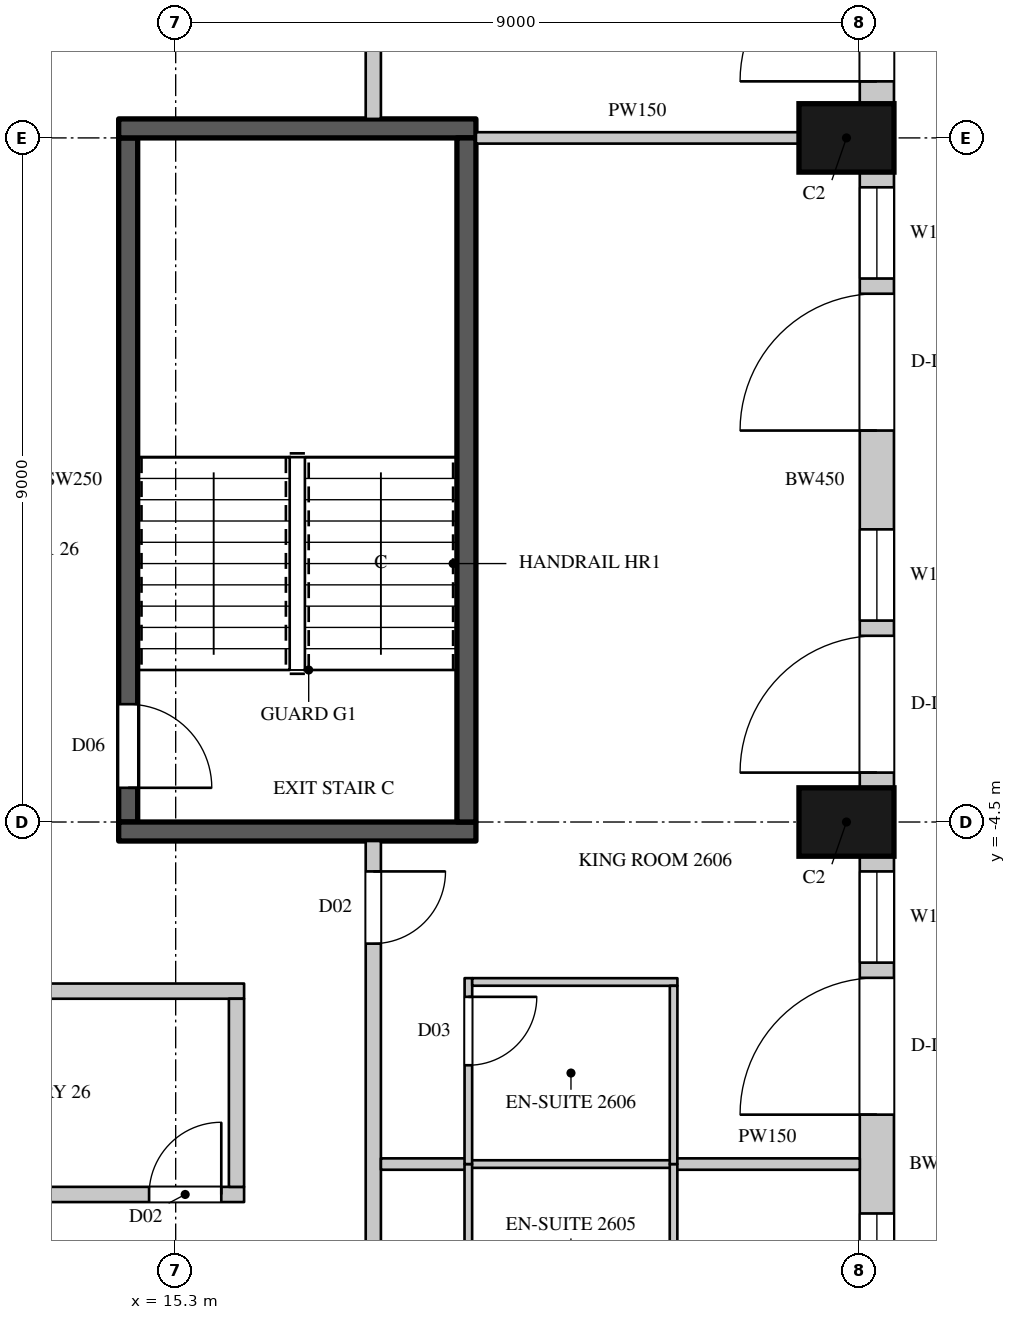
"""IFC4 building model, lengths in metres.
Left out: names, types, materials, properties, quantities, classifications, styles, units other than length and angle.
Written with IfcOpenShell. Run it as: python <this file> out.ifc"""

import sys

from ifc_helpers import new_model, si_unit, direction, frame, frame_2d, origin, origin_2d, place, context, subcontext, project, spatial, rectangle, extrude, element, fill, save


model = new_model("IFC4")
c1 = context("Model", 3, precision=1e-05, world=origin(), true_north=direction((0.0, 1.0)))
c2 = subcontext(c1, "Body", "Model", "MODEL_VIEW")
j1 = project(units=[si_unit("LENGTHUNIT", "METRE"), si_unit("PLANEANGLEUNIT", "RADIAN")], contexts=[c1])
p1 = place(None, origin())
s1 = spatial("IfcSite", under=j1, at=p1, CompositionType="ELEMENT")
p2 = place(p1, origin())
s2 = spatial("IfcBuilding", under=s1, at=p2, CompositionType="ELEMENT")
p3 = place(p2, frame((0.0, 0.0, 123.9)))
s3 = spatial("IfcBuildingStorey", under=s2, at=p3, CompositionType="ELEMENT", Elevation=123.9)
for number, where, z_axis, x_axis in (
    (1, (24.125, -4.5, 0.0), (0.0, 0.0, 1.0), (0.0, 1.0, 0.0)),
    (2, (24.125, 4.5, 0.0), (0.0, 0.0, 1.0), (0.0, 1.0, 0.0)),
):
    element("IfcColumn", number, at=place(p3, frame(where, z_axis=z_axis, x_axis=x_axis)), inside=s3, PredefinedType="COLUMN", context=c2, shape_type="SweptSolid", body=[
        extrude(rectangle(XDim=0.9, YDim=1.25, at=origin_2d()), origin(), (0.0, 0.0, 1.0), 3.6),
    ])
p4 = place(p3, frame((24.525, -13.05, 0.0), z_axis=(0.0, 0.0, 1.0), x_axis=(0.0, 1.0, 0.0)))
e3 = element("IfcWall", 3, at=p4, inside=s3, PredefinedType="SOLIDWALL", context=c2, shape_type="SweptSolid", body=[
    extrude(rectangle(XDim=8.1, YDim=0.45, at=frame_2d((4.05, 0.0))), origin(), (0.0, 0.0, 1.0), 3.3),
])
p5 = place(p4, frame((0.2, 0.0, 0.0)))
e4 = element("IfcOpeningElement", 4, at=p5, cuts=e3, PredefinedType="OPENING", context=c2, shape_type="SweptSolid", body=[
    extrude(rectangle(XDim=1.8, YDim=2.4, at=frame_2d((0.9, 1.2))), frame((0.0, 0.235, 0.0), z_axis=(0.0, -1.0, 0.0), x_axis=(1.0, 0.0, 0.0)), (0.0, 0.0, 1.0), 0.47),
])
p6 = place(p4, frame((2.2, 0.0, 1.05)))
e5 = element("IfcOpeningElement", 5, at=p6, cuts=e3, PredefinedType="OPENING", context=c2, shape_type="SweptSolid", body=[
    extrude(rectangle(XDim=1.2, YDim=2.0, at=frame_2d((0.6, 1.0))), frame((0.0, 0.235, 0.0), z_axis=(0.0, -1.0, 0.0), x_axis=(1.0, 0.0, 0.0)), (0.0, 0.0, 1.0), 0.47),
])
p7 = place(p4, frame((4.7, 0.0, 0.0)))
e6 = element("IfcOpeningElement", 6, at=p7, cuts=e3, PredefinedType="OPENING", context=c2, shape_type="SweptSolid", body=[
    extrude(rectangle(XDim=1.8, YDim=2.4, at=frame_2d((0.9, 1.2))), frame((0.0, 0.235, 0.0), z_axis=(0.0, -1.0, 0.0), x_axis=(1.0, 0.0, 0.0)), (0.0, 0.0, 1.0), 0.47),
])
p8 = place(p4, frame((6.7, 0.0, 1.05)))
e7 = element("IfcOpeningElement", 7, at=p8, cuts=e3, PredefinedType="OPENING", context=c2, shape_type="SweptSolid", body=[
    extrude(rectangle(XDim=1.2, YDim=2.0, at=frame_2d((0.6, 1.0))), frame((0.0, 0.235, 0.0), z_axis=(0.0, -1.0, 0.0), x_axis=(1.0, 0.0, 0.0)), (0.0, 0.0, 1.0), 0.47),
])
p9 = place(p3, frame((24.525, -4.05, 0.0), z_axis=(0.0, 0.0, 1.0), x_axis=(0.0, 1.0, 0.0)))
e8 = element("IfcWall", 8, at=p9, inside=s3, PredefinedType="SOLIDWALL", context=c2, shape_type="SweptSolid", body=[
    extrude(rectangle(XDim=8.1, YDim=0.45, at=frame_2d((4.05, 0.0))), origin(), (0.0, 0.0, 1.0), 3.3),
])
p10 = place(p9, frame((0.2, 0.0, 0.0)))
e9 = element("IfcOpeningElement", 9, at=p10, cuts=e8, PredefinedType="OPENING", context=c2, shape_type="SweptSolid", body=[
    extrude(rectangle(XDim=1.8, YDim=2.4, at=frame_2d((0.9, 1.2))), frame((0.0, 0.235, 0.0), z_axis=(0.0, -1.0, 0.0), x_axis=(1.0, 0.0, 0.0)), (0.0, 0.0, 1.0), 0.47),
])
p11 = place(p9, frame((2.2, 0.0, 1.05)))
e10 = element("IfcOpeningElement", 10, at=p11, cuts=e8, PredefinedType="OPENING", context=c2, shape_type="SweptSolid", body=[
    extrude(rectangle(XDim=1.2, YDim=2.0, at=frame_2d((0.6, 1.0))), frame((0.0, 0.235, 0.0), z_axis=(0.0, -1.0, 0.0), x_axis=(1.0, 0.0, 0.0)), (0.0, 0.0, 1.0), 0.47),
])
p12 = place(p9, frame((4.7, 0.0, 0.0)))
e11 = element("IfcOpeningElement", 11, at=p12, cuts=e8, PredefinedType="OPENING", context=c2, shape_type="SweptSolid", body=[
    extrude(rectangle(XDim=1.8, YDim=2.4, at=frame_2d((0.9, 1.2))), frame((0.0, 0.235, 0.0), z_axis=(0.0, -1.0, 0.0), x_axis=(1.0, 0.0, 0.0)), (0.0, 0.0, 1.0), 0.47),
])
p13 = place(p9, frame((6.7, 0.0, 1.05)))
e12 = element("IfcOpeningElement", 12, at=p13, cuts=e8, PredefinedType="OPENING", context=c2, shape_type="SweptSolid", body=[
    extrude(rectangle(XDim=1.2, YDim=2.0, at=frame_2d((0.6, 1.0))), frame((0.0, 0.235, 0.0), z_axis=(0.0, -1.0, 0.0), x_axis=(1.0, 0.0, 0.0)), (0.0, 0.0, 1.0), 0.47),
])
p14 = place(p3, frame((24.525, 4.95, 0.0), z_axis=(0.0, 0.0, 1.0), x_axis=(0.0, 1.0, 0.0)))
e13 = element("IfcWall", 13, at=p14, inside=s3, PredefinedType="SOLIDWALL", context=c2, shape_type="SweptSolid", body=[
    extrude(rectangle(XDim=8.439, YDim=0.45, at=frame_2d((4.219, 0.0))), origin(), (0.0, 0.0, 1.0), 3.3),
])
p15 = place(p14, frame((0.294, 0.0, 0.0)))
e14 = element("IfcOpeningElement", 14, at=p15, cuts=e13, PredefinedType="OPENING", context=c2, shape_type="SweptSolid", body=[
    extrude(rectangle(XDim=1.8, YDim=2.4, at=frame_2d((0.9, 1.2))), frame((0.0, 0.235, 0.0), z_axis=(0.0, -1.0, 0.0), x_axis=(1.0, 0.0, 0.0)), (0.0, 0.0, 1.0), 0.47),
])
p16 = place(p14, frame((2.294, 0.0, 1.05)))
e15 = element("IfcOpeningElement", 15, at=p16, cuts=e13, PredefinedType="OPENING", context=c2, shape_type="SweptSolid", body=[
    extrude(rectangle(XDim=1.2, YDim=2.0, at=frame_2d((0.6, 1.0))), frame((0.0, 0.235, 0.0), z_axis=(0.0, -1.0, 0.0), x_axis=(1.0, 0.0, 0.0)), (0.0, 0.0, 1.0), 0.47),
])
p17 = place(p14, frame((5.232, 0.0, 1.05)))
e16 = element("IfcOpeningElement", 16, at=p17, cuts=e13, PredefinedType="OPENING", context=c2, shape_type="SweptSolid", body=[
    extrude(rectangle(XDim=2.7, YDim=2.0, at=frame_2d((1.35, 1.0))), frame((0.0, 0.235, 0.0), z_axis=(0.0, -1.0, 0.0), x_axis=(1.0, 0.0, 0.0)), (0.0, 0.0, 1.0), 0.47),
])
p18 = place(p3, frame((10.9, -9.4, 0.0), z_axis=(0.0, 0.0, 1.0), x_axis=(1.0, 0.0, 0.0)))
e17 = element("IfcWall", 17, at=p18, inside=s3, PredefinedType="PARTITIONING", context=c2, shape_type="SweptSolid", body=[
    extrude(rectangle(XDim=5.3, YDim=0.2, at=frame_2d((2.65, 0.0))), origin(), (0.0, 0.0, 1.0), 3.3),
])
p19 = place(p18, frame((4.05, 0.0, 0.0)))
e18 = element("IfcOpeningElement", 18, at=p19, cuts=e17, PredefinedType="OPENING", context=c2, shape_type="SweptSolid", body=[
    extrude(rectangle(XDim=0.95, YDim=2.2, at=frame_2d((0.475, 1.1))), frame((0.0, 0.11, 0.0), z_axis=(0.0, -1.0, 0.0), x_axis=(1.0, 0.0, 0.0)), (0.0, 0.0, 1.0), 0.22),
])
p20 = place(p3, frame((10.9, -6.725, 0.0), z_axis=(0.0, 0.0, 1.0), x_axis=(1.0, 0.0, 0.0)))
e19 = element("IfcWall", 19, at=p20, inside=s3, PredefinedType="PARTITIONING", context=c2, shape_type="SweptSolid", body=[
    extrude(rectangle(XDim=5.3, YDim=0.2, at=frame_2d((2.65, 0.0))), origin(), (0.0, 0.0, 1.0), 3.3),
])
p21 = place(p3, frame((16.1, -9.3, 0.0), z_axis=(0.0, 0.0, 1.0), x_axis=(0.0, 1.0, 0.0)))
e20 = element("IfcWall", 20, at=p21, inside=s3, PredefinedType="PARTITIONING", context=c2, shape_type="SweptSolid", body=[
    extrude(rectangle(XDim=2.475, YDim=0.2, at=frame_2d((1.238, 0.0))), origin(), (0.0, 0.0, 1.0), 3.3),
])
p22 = place(p3, frame((17.9, -19.3, 0.0), z_axis=(0.0, 0.0, 1.0), x_axis=(0.0, 1.0, 0.0)))
e21 = element("IfcWall", 21, at=p22, inside=s3, PredefinedType="PARTITIONING", context=c2, shape_type="SweptSolid", body=[
    extrude(rectangle(XDim=14.55, YDim=0.2, at=frame_2d((7.275, 0.0))), origin(), (0.0, 0.0, 1.0), 3.3),
])
p23 = place(p22, frame((3.7, 0.0, 0.0)))
e22 = element("IfcOpeningElement", 22, at=p23, cuts=e21, PredefinedType="OPENING", context=c2, shape_type="SweptSolid", body=[
    extrude(rectangle(XDim=0.95, YDim=2.2, at=frame_2d((0.475, 1.1))), frame((0.0, 0.11, 0.0), z_axis=(0.0, -1.0, 0.0), x_axis=(1.0, 0.0, 0.0)), (0.0, 0.0, 1.0), 0.22),
])
p24 = place(p22, frame((13.2, 0.0, 0.0)))
e23 = element("IfcOpeningElement", 23, at=p24, cuts=e21, PredefinedType="OPENING", context=c2, shape_type="SweptSolid", body=[
    extrude(rectangle(XDim=0.95, YDim=2.2, at=frame_2d((0.475, 1.1))), frame((0.0, 0.11, 0.0), z_axis=(0.0, -1.0, 0.0), x_axis=(1.0, 0.0, 0.0)), (0.0, 0.0, 1.0), 0.22),
])
p25 = place(p3, frame((17.9, 4.75, 0.0), z_axis=(0.0, 0.0, 1.0), x_axis=(0.0, 1.0, 0.0)))
e24 = element("IfcWall", 24, at=p25, inside=s3, PredefinedType="PARTITIONING", context=c2, shape_type="SweptSolid", body=[
    extrude(rectangle(XDim=14.314, YDim=0.2, at=frame_2d((7.157, 0.0))), origin(), (0.0, 0.0, 1.0), 3.3),
])
p26 = place(p25, frame((1.7, 0.0, 0.0)))
e25 = element("IfcOpeningElement", 25, at=p26, cuts=e24, PredefinedType="OPENING", context=c2, shape_type="SweptSolid", body=[
    extrude(rectangle(XDim=0.9, YDim=2.2, at=frame_2d((0.45, 1.1))), frame((0.0, 0.11, 0.0), z_axis=(0.0, -1.0, 0.0), x_axis=(1.0, 0.0, 0.0)), (0.0, 0.0, 1.0), 0.22),
])
p27 = place(p25, frame((10.2, 0.0, 0.0)))
e26 = element("IfcOpeningElement", 26, at=p27, cuts=e24, PredefinedType="OPENING", context=c2, shape_type="SweptSolid", body=[
    extrude(rectangle(XDim=0.95, YDim=2.2, at=frame_2d((0.475, 1.1))), frame((0.0, 0.11, 0.0), z_axis=(0.0, -1.0, 0.0), x_axis=(1.0, 0.0, 0.0)), (0.0, 0.0, 1.0), 0.22),
])
p28 = place(p3, frame((18.0, -9.0, 0.0), z_axis=(0.0, 0.0, 1.0), x_axis=(1.0, 0.0, 0.0)))
e27 = element("IfcWall", 27, at=p28, inside=s3, PredefinedType="PARTITIONING", context=c2, shape_type="SweptSolid", body=[
    extrude(rectangle(XDim=1.13, YDim=0.15, at=frame_2d((0.565, 0.0))), origin(), (0.0, 0.0, 1.0), 2.65),
])
p29 = place(p3, frame((19.25, 4.5, 0.0), z_axis=(0.0, 0.0, 1.0), x_axis=(1.0, 0.0, 0.0)))
e28 = element("IfcWall", 28, at=p29, inside=s3, PredefinedType="PARTITIONING", context=c2, shape_type="SweptSolid", body=[
    extrude(rectangle(XDim=4.25, YDim=0.15, at=frame_2d((2.125, 0.0))), origin(), (0.0, 0.0, 1.0), 3.3),
])
p30 = place(p3, frame((21.87, -9.0, 0.0), z_axis=(0.0, 0.0, 1.0), x_axis=(1.0, 0.0, 0.0)))
e29 = element("IfcWall", 29, at=p30, inside=s3, PredefinedType="PARTITIONING", context=c2, shape_type="SweptSolid", body=[
    extrude(rectangle(XDim=2.43, YDim=0.15, at=frame_2d((1.215, 0.0))), origin(), (0.0, 0.0, 1.0), 2.65),
])
p31 = place(p3, frame((14.675, -4.5, 0.0), z_axis=(0.0, 0.0, 1.0), x_axis=(0.0, 1.0, 0.0)))
e30 = element("IfcWall", 30, at=p31, inside=s3, PredefinedType="SHEAR", context=c2, shape_type="SweptSolid", body=[
    extrude(rectangle(XDim=9.0, YDim=0.25, at=frame_2d((4.5, 0.0))), origin(), (0.0, 0.0, 1.0), 3.3),
])
p32 = place(p31, frame((0.45, 0.0, 0.0)))
e31 = element("IfcOpeningElement", 31, at=p32, cuts=e30, PredefinedType="OPENING", context=c2, shape_type="SweptSolid", body=[
    extrude(rectangle(XDim=1.1, YDim=2.2, at=frame_2d((0.55, 1.1))), frame((0.0, 0.135, 0.0), z_axis=(0.0, -1.0, 0.0), x_axis=(1.0, 0.0, 0.0)), (0.0, 0.0, 1.0), 0.27),
])
for number, where, z_axis, x_axis in (
    (32, (14.55, -4.625, 0.0), (0.0, 0.0, 1.0), (1.0, 0.0, 0.0)),
    (33, (14.55, 4.625, 0.0), (0.0, 0.0, 1.0), (1.0, 0.0, 0.0)),
):
    element("IfcWall", number, at=place(p3, frame(where, z_axis=z_axis, x_axis=x_axis)), inside=s3, PredefinedType="SHEAR", context=c2, shape_type="SweptSolid", body=[
        extrude(rectangle(XDim=4.7, YDim=0.25, at=frame_2d((2.35, 0.0))), origin(), (0.0, 0.0, 1.0), 3.3),
    ])
p33 = place(p3, frame((19.125, -4.5, 0.0), z_axis=(0.0, 0.0, 1.0), x_axis=(0.0, 1.0, 0.0)))
e34 = element("IfcWall", 34, at=p33, inside=s3, PredefinedType="SHEAR", context=c2, shape_type="SweptSolid", body=[
    extrude(rectangle(XDim=9.0, YDim=0.25, at=frame_2d((4.5, 0.0))), origin(), (0.0, 0.0, 1.0), 3.3),
])
p34 = place(p3, frame((19.13, -9.0, 0.0), z_axis=(0.0, 0.0, 1.0), x_axis=(1.0, 0.0, 0.0)))
e35 = element("IfcWall", 35, at=p34, inside=s3, PredefinedType="PARTITIONING", context=c2, shape_type="SweptSolid", body=[
    extrude(rectangle(XDim=2.74, YDim=0.1, at=frame_2d((1.37, 0.0))), origin(), (0.0, 0.0, 1.0), 2.65),
])
p35 = place(p3, frame((19.15, -11.346, 0.0), z_axis=(0.0, 0.0, 1.0), x_axis=(0.0, 1.0, 0.0)))
e36 = element("IfcWall", 36, at=p35, inside=s3, PredefinedType="PARTITIONING", context=c2, shape_type="SweptSolid", body=[
    extrude(rectangle(XDim=2.346, YDim=0.1, at=frame_2d((1.173, 0.0))), origin(), (0.0, 0.0, 1.0), 3.3),
])
p36 = place(p35, frame((0.15, 0.0, 0.0)))
e37 = element("IfcOpeningElement", 37, at=p36, cuts=e36, PredefinedType="OPENING", context=c2, shape_type="SweptSolid", body=[
    extrude(rectangle(XDim=0.9, YDim=2.2, at=frame_2d((0.45, 1.1))), frame((0.0, 0.06, 0.0), z_axis=(0.0, -1.0, 0.0), x_axis=(1.0, 0.0, 0.0)), (0.0, 0.0, 1.0), 0.12),
])
p37 = place(p3, frame((19.15, -9.0, 0.0), z_axis=(0.0, 0.0, 1.0), x_axis=(0.000499051739, 0.999999875474, 0.0)))
e38 = element("IfcWall", 38, at=p37, inside=s3, PredefinedType="PARTITIONING", context=c2, shape_type="SweptSolid", body=[
    extrude(rectangle(XDim=2.446, YDim=0.1, at=frame_2d((1.223, 0.0))), origin(), (0.0, 0.0, 1.0), 3.3),
])
p38 = place(p37, frame((1.3, 0.0, 0.0)))
e39 = element("IfcOpeningElement", 39, at=p38, cuts=e38, PredefinedType="OPENING", context=c2, shape_type="SweptSolid", body=[
    extrude(rectangle(XDim=0.9, YDim=2.2, at=frame_2d((0.45, 1.1))), frame((0.0, 0.06, 0.0), z_axis=(0.0, -1.0, 0.0), x_axis=(1.0, 0.0, 0.0)), (0.0, 0.0, 1.0), 0.12),
])
p39 = place(p3, frame((19.201, -6.604, 0.0), z_axis=(0.0, 0.0, 1.0), x_axis=(0.999999934588, -0.000361696332, 0.0)))
e40 = element("IfcWall", 40, at=p39, inside=s3, PredefinedType="PARTITIONING", context=c2, shape_type="SweptSolid", body=[
    extrude(rectangle(XDim=2.7, YDim=0.1, at=frame_2d((1.35, 0.0))), origin(), (0.0, 0.0, 1.0), 3.3),
])
p40 = place(p3, frame((21.85, -11.346, 0.0), z_axis=(0.0, 0.0, 1.0), x_axis=(0.0, 1.0, 0.0)))
e41 = element("IfcWall", 41, at=p40, inside=s3, PredefinedType="PARTITIONING", context=c2, shape_type="SweptSolid", body=[
    extrude(rectangle(XDim=2.346, YDim=0.1, at=frame_2d((1.173, 0.0))), origin(), (0.0, 0.0, 1.0), 3.3),
])
p41 = place(p3, frame((21.85, -9.0, 0.0), z_axis=(0.0, 0.0, 1.0), x_axis=(0.00041644973, 0.999999913285, 0.0)))
e42 = element("IfcWall", 42, at=p41, inside=s3, PredefinedType="PARTITIONING", context=c2, shape_type="SweptSolid", body=[
    extrude(rectangle(XDim=2.345, YDim=0.1, at=frame_2d((1.172, 0.0))), origin(), (0.0, 0.0, 1.0), 3.3),
])
p42 = place(p6, origin())
e43 = element("IfcWindow", 43, at=p42, inside=s3, PartitioningType="SINGLE_PANEL", PredefinedType="WINDOW", context=c2, shape_type="SweptSolid", body=[
    extrude(rectangle(XDim=1.2, YDim=2.0, at=frame_2d((0.6, 1.0))), frame((0.0, 0.135, 0.0), z_axis=(0.0, -1.0, 0.0), x_axis=(1.0, 0.0, 0.0)), (0.0, 0.0, 1.0), 0.06),
])
fill(e5, e43)
p43 = place(p7, origin())
e44 = element("IfcDoor", 44, at=p43, inside=s3, OperationType="SLIDING_TO_LEFT", PredefinedType="DOOR", context=c2, shape_type="SweptSolid", body=[
    extrude(rectangle(XDim=1.8, YDim=2.4, at=frame_2d((0.9, 1.2))), frame((0.0, 0.13, 0.0), z_axis=(0.0, -1.0, 0.0), x_axis=(1.0, 0.0, 0.0)), (0.0, 0.0, 1.0), 0.05),
])
fill(e6, e44)
p44 = place(p8, origin())
e45 = element("IfcWindow", 45, at=p44, inside=s3, PartitioningType="SINGLE_PANEL", PredefinedType="WINDOW", context=c2, shape_type="SweptSolid", body=[
    extrude(rectangle(XDim=1.2, YDim=2.0, at=frame_2d((0.6, 1.0))), frame((0.0, 0.135, 0.0), z_axis=(0.0, -1.0, 0.0), x_axis=(1.0, 0.0, 0.0)), (0.0, 0.0, 1.0), 0.06),
])
fill(e7, e45)
p45 = place(p10, origin())
e46 = element("IfcDoor", 46, at=p45, inside=s3, OperationType="SLIDING_TO_LEFT", PredefinedType="DOOR", context=c2, shape_type="SweptSolid", body=[
    extrude(rectangle(XDim=1.8, YDim=2.4, at=frame_2d((0.9, 1.2))), frame((0.0, 0.13, 0.0), z_axis=(0.0, -1.0, 0.0), x_axis=(1.0, 0.0, 0.0)), (0.0, 0.0, 1.0), 0.05),
])
fill(e9, e46)
p46 = place(p11, origin())
e47 = element("IfcWindow", 47, at=p46, inside=s3, PartitioningType="SINGLE_PANEL", PredefinedType="WINDOW", context=c2, shape_type="SweptSolid", body=[
    extrude(rectangle(XDim=1.2, YDim=2.0, at=frame_2d((0.6, 1.0))), frame((0.0, 0.135, 0.0), z_axis=(0.0, -1.0, 0.0), x_axis=(1.0, 0.0, 0.0)), (0.0, 0.0, 1.0), 0.06),
])
fill(e10, e47)
p47 = place(p12, origin())
e48 = element("IfcDoor", 48, at=p47, inside=s3, OperationType="SLIDING_TO_LEFT", PredefinedType="DOOR", context=c2, shape_type="SweptSolid", body=[
    extrude(rectangle(XDim=1.8, YDim=2.4, at=frame_2d((0.9, 1.2))), frame((0.0, 0.13, 0.0), z_axis=(0.0, -1.0, 0.0), x_axis=(1.0, 0.0, 0.0)), (0.0, 0.0, 1.0), 0.05),
])
fill(e11, e48)
p48 = place(p13, origin())
e49 = element("IfcWindow", 49, at=p48, inside=s3, PartitioningType="SINGLE_PANEL", PredefinedType="WINDOW", context=c2, shape_type="SweptSolid", body=[
    extrude(rectangle(XDim=1.2, YDim=2.0, at=frame_2d((0.6, 1.0))), frame((0.0, 0.135, 0.0), z_axis=(0.0, -1.0, 0.0), x_axis=(1.0, 0.0, 0.0)), (0.0, 0.0, 1.0), 0.06),
])
fill(e12, e49)
p49 = place(p15, origin())
e50 = element("IfcDoor", 50, at=p49, inside=s3, OperationType="SLIDING_TO_LEFT", PredefinedType="DOOR", context=c2, shape_type="SweptSolid", body=[
    extrude(rectangle(XDim=1.8, YDim=2.4, at=frame_2d((0.9, 1.2))), frame((0.0, 0.13, 0.0), z_axis=(0.0, -1.0, 0.0), x_axis=(1.0, 0.0, 0.0)), (0.0, 0.0, 1.0), 0.05),
])
fill(e14, e50)
p50 = place(p19, origin())
e51 = element("IfcDoor", 51, at=p50, inside=s3, OperationType="SINGLE_SWING_RIGHT", PredefinedType="DOOR", context=c2, shape_type="SweptSolid", body=[
    extrude(rectangle(XDim=0.95, YDim=2.2, at=frame_2d((0.475, 1.1))), frame((0.0, 0.025, 0.0), z_axis=(0.0, -1.0, 0.0), x_axis=(1.0, 0.0, 0.0)), (0.0, 0.0, 1.0), 0.05),
])
fill(e18, e51)
p51 = place(p24, origin())
e52 = element("IfcDoor", 52, at=p51, inside=s3, OperationType="SINGLE_SWING_LEFT", PredefinedType="DOOR", context=c2, shape_type="SweptSolid", body=[
    extrude(rectangle(XDim=0.95, YDim=2.2, at=frame_2d((0.475, 1.1))), frame((0.0, 0.025, 0.0), z_axis=(0.0, -1.0, 0.0), x_axis=(1.0, 0.0, 0.0)), (0.0, 0.0, 1.0), 0.05),
])
fill(e23, e52)
p52 = place(p38, origin())
e53 = element("IfcDoor", 53, at=p52, inside=s3, OperationType="SINGLE_SWING_LEFT", PredefinedType="DOOR", context=c2, shape_type="SweptSolid", body=[
    extrude(rectangle(XDim=0.9, YDim=2.2, at=frame_2d((0.45, 1.1))), frame((0.0, 0.025, 0.0), z_axis=(0.0, -1.0, 0.0), x_axis=(1.0, 0.0, 0.0)), (0.0, 0.0, 1.0), 0.05),
])
fill(e39, e53)
p53 = place(p32, origin())
e54 = element("IfcDoor", 54, at=p53, inside=s3, OperationType="SINGLE_SWING_RIGHT", PredefinedType="DOOR", context=c2, shape_type="SweptSolid", body=[
    extrude(rectangle(XDim=1.1, YDim=2.2, at=frame_2d((0.55, 1.1))), frame((0.0, 0.025, 0.0), z_axis=(0.0, -1.0, 0.0), x_axis=(1.0, 0.0, 0.0)), (0.0, 0.0, 1.0), 0.05),
])
fill(e31, e54)
save(model, sys.argv[1])
